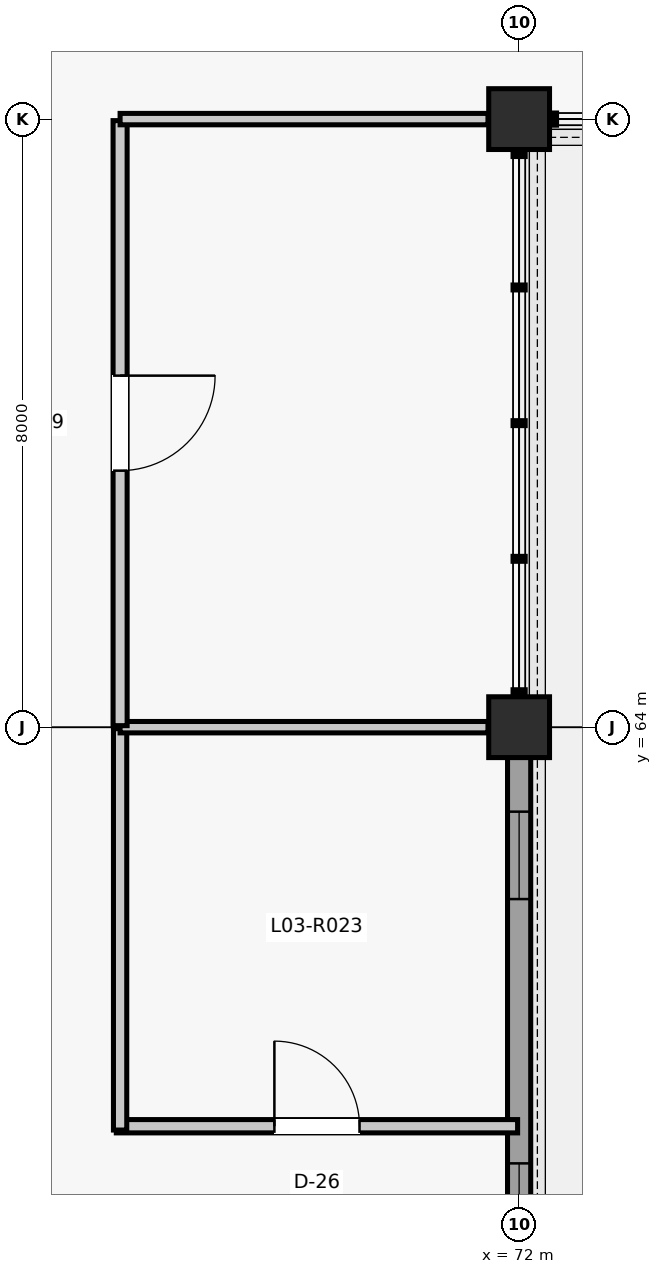
"""IFC4 building model, lengths in metres.
Left out: names, types, materials, properties, quantities, classifications, styles, units other than length and angle.
Written with IfcOpenShell. Run it as: python <this file> out.ifc"""

import sys

from ifc_helpers import new_model, si_unit, direction, frame, frame_2d, origin, origin_2d, place, context, subcontext, project, spatial, rectangle, extrude, element, fill, save


model = new_model("IFC4")
c1 = context("Model", 3, precision=1e-05, world=origin(), true_north=direction((0.0, 1.0)))
c2 = subcontext(c1, "Body", "Model", "MODEL_VIEW")
j1 = project(units=[si_unit("LENGTHUNIT", "METRE"), si_unit("PLANEANGLEUNIT", "RADIAN")], contexts=[c1])
p1 = place(None, origin())
s1 = spatial("IfcSite", under=j1, at=p1, CompositionType="ELEMENT")
p2 = place(p1, origin())
s2 = spatial("IfcBuilding", under=s1, at=p2, CompositionType="ELEMENT")
p3 = place(p2, frame((0.0, 0.0, 13.86)))
s3 = spatial("IfcBuildingStorey", under=s2, at=p3, CompositionType="ELEMENT", Elevation=13.86)
for number, where, z_axis, x_axis in (
    (1, (72.0, 64.0, 0.0), (0.0, 0.0, 1.0), (1.0, 0.0, 0.0)),
    (2, (72.0, 72.0, 0.0), (0.0, 0.0, 1.0), (1.0, 0.0, 0.0)),
):
    element("IfcColumn", number, at=place(p3, frame(where, z_axis=z_axis, x_axis=x_axis)), inside=s3, PredefinedType="COLUMN", context=c2, shape_type="SweptSolid", body=[
        extrude(rectangle(XDim=0.8, YDim=0.8, at=origin_2d()), origin(), (0.0, 0.0, 1.0), 3.96),
    ])
p4 = place(p3, frame((72.0, 56.385, 0.0), z_axis=(0.0, 0.0, 1.0), x_axis=(0.0, 1.0, 0.0)))
e3 = element("IfcWall", 3, at=p4, inside=s3, PredefinedType="SOLIDWALL", context=c2, shape_type="SweptSolid", body=[
    extrude(rectangle(XDim=7.23, YDim=0.305, at=frame_2d((3.615, 0.0))), origin(), (0.0, 0.0, 1.0), 3.367),
])
p5 = place(p4, frame((0.726, 0.0, 0.95)))
e4 = element("IfcOpeningElement", 4, at=p5, cuts=e3, PredefinedType="OPENING", context=c2, shape_type="SweptSolid", body=[
    extrude(rectangle(XDim=1.15, YDim=1.65, at=frame_2d((0.575, 0.825))), frame((0.0, 0.162, 0.0), z_axis=(0.0, -1.0, 0.0), x_axis=(1.0, 0.0, 0.0)), (0.0, 0.0, 1.0), 0.325),
])
p6 = place(p4, frame((5.354, 0.0, 0.95)))
e5 = element("IfcOpeningElement", 5, at=p6, cuts=e3, PredefinedType="OPENING", context=c2, shape_type="SweptSolid", body=[
    extrude(rectangle(XDim=1.15, YDim=1.65, at=frame_2d((0.575, 0.825))), frame((0.0, 0.162, 0.0), z_axis=(0.0, -1.0, 0.0), x_axis=(1.0, 0.0, 0.0)), (0.0, 0.0, 1.0), 0.325),
])
p7 = place(p3, frame((66.7, 58.75, 0.0), z_axis=(0.0, 0.0, 1.0), x_axis=(1.0, 0.0, 0.0)))
e6 = element("IfcWall", 6, at=p7, inside=s3, PredefinedType="PARTITIONING", context=c2, shape_type="SweptSolid", body=[
    extrude(rectangle(XDim=5.28, YDim=0.175, at=frame_2d((2.64, 0.0))), origin(), (0.0, 0.0, 1.0), 3.36),
])
p8 = place(p7, frame((2.08, 0.0, 0.0)))
e7 = element("IfcOpeningElement", 7, at=p8, cuts=e6, PredefinedType="OPENING", context=c2, shape_type="SweptSolid", body=[
    extrude(rectangle(XDim=1.12, YDim=2.22, at=frame_2d((0.56, 1.11))), frame((0.0, 0.097, 0.0), z_axis=(0.0, -1.0, 0.0), x_axis=(1.0, 0.0, 0.0)), (0.0, 0.0, 1.0), 0.195),
])
p9 = place(p3, frame((66.75, 58.7, 0.0), z_axis=(0.0, 0.0, 1.0), x_axis=(0.0, 1.0, 0.0)))
e8 = element("IfcWall", 8, at=p9, inside=s3, PredefinedType="PARTITIONING", context=c2, shape_type="SweptSolid", body=[
    extrude(rectangle(XDim=5.28, YDim=0.175, at=frame_2d((2.64, 0.0))), origin(), (0.0, 0.0, 1.0), 3.247),
])
p10 = place(p3, frame((66.75, 64.0, 0.0), z_axis=(0.0, 0.0, 1.0), x_axis=(1.0, 0.0, 0.0)))
e9 = element("IfcWall", 9, at=p10, inside=s3, PredefinedType="PARTITIONING", context=c2, shape_type="SweptSolid", body=[
    extrude(rectangle(XDim=4.84, YDim=0.15, at=frame_2d((2.42, 0.0))), origin(), (0.0, 0.0, 1.0), 3.247),
])
p11 = place(p3, frame((66.75, 64.02, 0.0), z_axis=(0.0, 0.0, 1.0), x_axis=(0.0, 1.0, 0.0)))
e10 = element("IfcWall", 10, at=p11, inside=s3, PredefinedType="PARTITIONING", context=c2, shape_type="SweptSolid", body=[
    extrude(rectangle(XDim=7.96, YDim=0.185, at=frame_2d((3.98, 0.0))), origin(), (0.0, 0.0, 1.0), 3.247),
])
p12 = place(p11, frame((3.355, 0.0, 0.0)))
e11 = element("IfcOpeningElement", 11, at=p12, cuts=e10, PredefinedType="OPENING", context=c2, shape_type="SweptSolid", body=[
    extrude(rectangle(XDim=1.25, YDim=2.18, at=frame_2d((0.625, 1.09))), frame((0.0, 0.103, 0.0), z_axis=(0.0, -1.0, 0.0), x_axis=(1.0, 0.0, 0.0)), (0.0, 0.0, 1.0), 0.205),
])
p13 = place(p3, frame((66.75, 72.0, 0.0), z_axis=(0.0, 0.0, 1.0), x_axis=(1.0, 0.0, 0.0)))
e12 = element("IfcWall", 12, at=p13, inside=s3, PredefinedType="PARTITIONING", context=c2, shape_type="SweptSolid", body=[
    extrude(rectangle(XDim=4.84, YDim=0.15, at=frame_2d((2.42, 0.0))), origin(), (0.0, 0.0, 1.0), 3.253),
])
p14 = place(p5, origin())
e13 = element("IfcWindow", 13, at=p14, inside=s3, PartitioningType="SINGLE_PANEL", PredefinedType="WINDOW", context=c2, shape_type="SweptSolid", body=[
    extrude(rectangle(XDim=1.15, YDim=1.65, at=frame_2d((0.575, 0.825))), frame((0.0, 0.03, 0.0), z_axis=(0.0, -1.0, 0.0), x_axis=(1.0, 0.0, 0.0)), (0.0, 0.0, 1.0), 0.06),
])
fill(e4, e13)
p15 = place(p6, origin())
e14 = element("IfcWindow", 14, at=p15, inside=s3, PartitioningType="SINGLE_PANEL", PredefinedType="WINDOW", context=c2, shape_type="SweptSolid", body=[
    extrude(rectangle(XDim=1.15, YDim=1.65, at=frame_2d((0.575, 0.825))), frame((0.0, 0.03, 0.0), z_axis=(0.0, -1.0, 0.0), x_axis=(1.0, 0.0, 0.0)), (0.0, 0.0, 1.0), 0.06),
])
fill(e5, e14)
p16 = place(p8, origin())
e15 = element("IfcDoor", 15, at=p16, inside=s3, OperationType="SINGLE_SWING_LEFT", PredefinedType="DOOR", context=c2, shape_type="SweptSolid", body=[
    extrude(rectangle(XDim=1.12, YDim=2.22, at=frame_2d((0.56, 1.11))), frame((0.0, 0.025, 0.0), z_axis=(0.0, -1.0, 0.0), x_axis=(1.0, 0.0, 0.0)), (0.0, 0.0, 1.0), 0.05),
])
fill(e7, e15)
p17 = place(p12, frame((1.25, 0.0, 0.0), z_axis=(0.0, 0.0, 1.0), x_axis=(-1.0, 0.0, 0.0)))
e16 = element("IfcDoor", 16, at=p17, inside=s3, OperationType="SINGLE_SWING_RIGHT", PredefinedType="DOOR", context=c2, shape_type="SweptSolid", body=[
    extrude(rectangle(XDim=1.25, YDim=2.18, at=frame_2d((0.625, 1.09))), frame((0.0, 0.025, 0.0), z_axis=(0.0, -1.0, 0.0), x_axis=(1.0, 0.0, 0.0)), (0.0, 0.0, 1.0), 0.05),
])
fill(e11, e16)
save(model, sys.argv[1])
